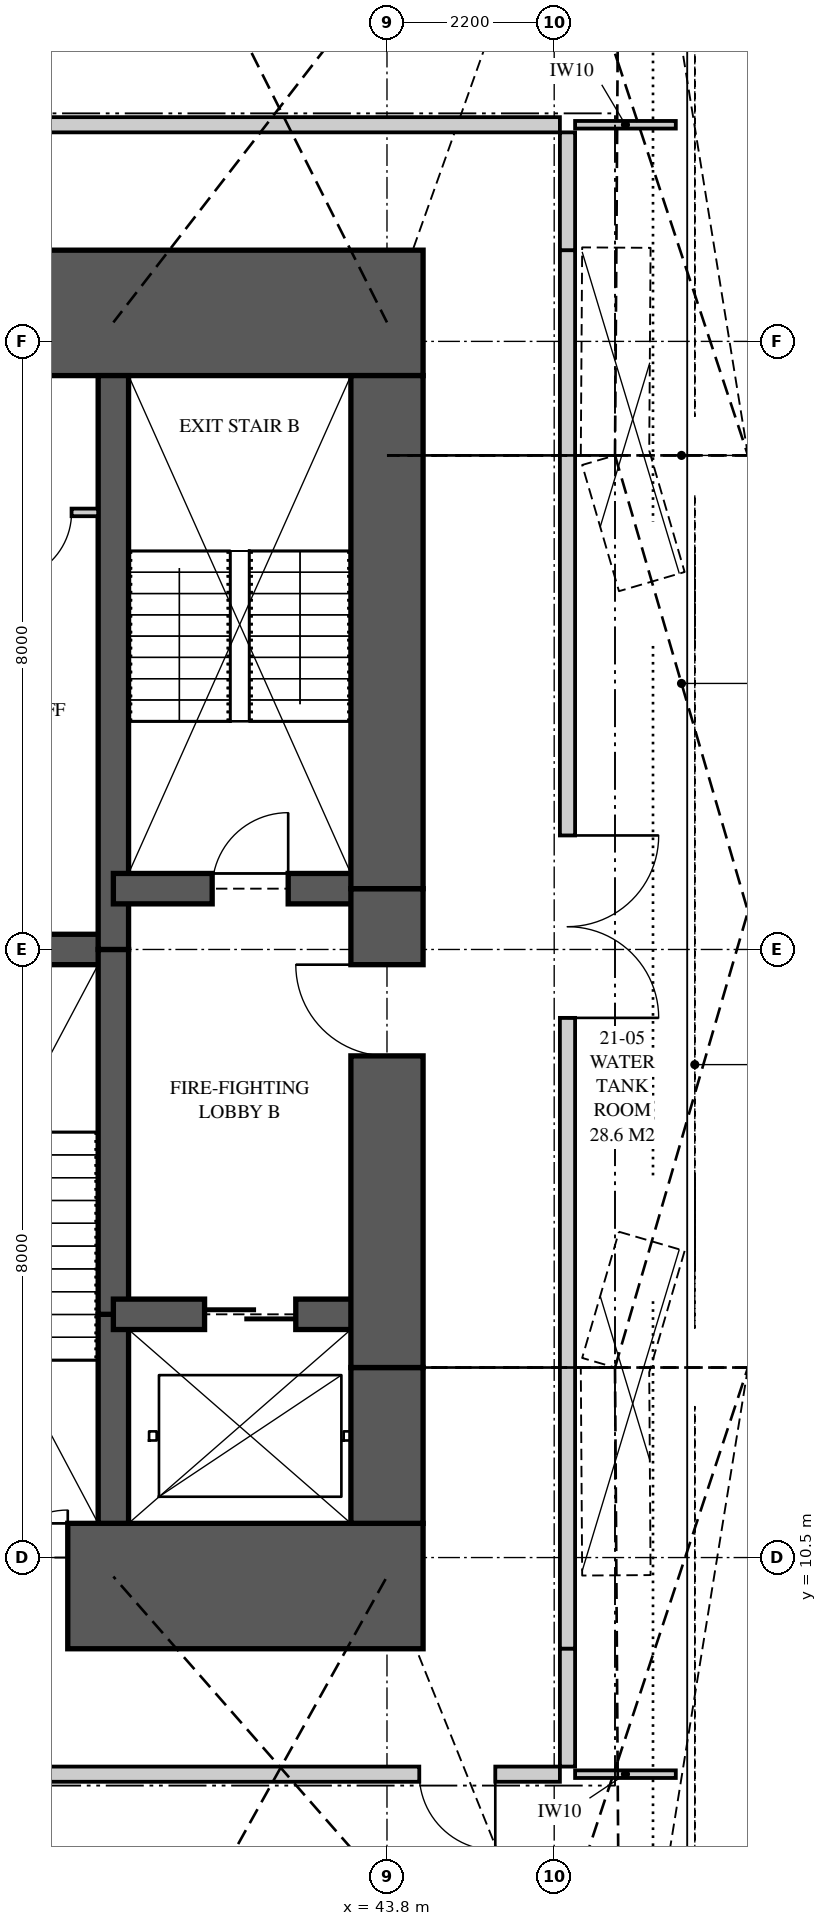
"""IFC4 building model, lengths in metres.
Left out: names, types, materials, properties, quantities, classifications, styles, units other than length and angle.
Written with IfcOpenShell. Run it as: python <this file> out.ifc"""

import sys

from ifc_helpers import new_model, si_unit, direction, frame, frame_2d, origin, place, context, subcontext, project, spatial, polyline, rectangle, outline, extrude, element, fill, save


model = new_model("IFC4")
c1 = context("Model", 3, precision=1e-05, world=origin(), true_north=direction((0.0, 1.0)))
c2 = subcontext(c1, "Body", "Model", "MODEL_VIEW")
j1 = project(units=[si_unit("LENGTHUNIT", "METRE"), si_unit("PLANEANGLEUNIT", "RADIAN")], contexts=[c1])
p1 = place(None, origin())
s1 = spatial("IfcSite", under=j1, at=p1, CompositionType="ELEMENT")
p2 = place(p1, origin())
s2 = spatial("IfcBuilding", under=s1, at=p2, CompositionType="ELEMENT")
p3 = place(p2, frame((0.0, 0.0, 79.75)))
s3 = spatial("IfcBuildingStorey", under=s2, at=p3, CompositionType="ELEMENT", Elevation=79.75)
p4 = place(p3, frame((35.9, 10.125, 0.0), z_axis=(0.0, 0.0, 1.0), x_axis=(1.0, 0.0, 0.0)))
e1 = element("IfcWall", 1, at=p4, inside=s3, PredefinedType="SHEAR", context=c2, shape_type="SweptSolid", body=[
    extrude(rectangle(XDim=8.375, YDim=1.65, at=frame_2d((4.188, 0.0))), origin(), (0.0, 0.0, 1.0), 5.0),
])
p5 = place(p4, frame((2.7, 0.0, 0.0)))
e2 = element("IfcOpeningElement", 2, at=p5, cuts=e1, PredefinedType="OPENING", context=c2, shape_type="SweptSolid", body=[
    extrude(rectangle(XDim=1.0, YDim=2.1, at=frame_2d((0.5, 1.05))), frame((0.0, 0.835, 0.0), z_axis=(0.0, -1.0, 0.0), x_axis=(1.0, 0.0, 0.0)), (0.0, 0.0, 1.0), 1.67),
])
p6 = place(p3, frame((44.275, 26.875, 0.0), z_axis=(0.0, 0.0, 1.0), x_axis=(-1.0, 0.0, 0.0)))
e3 = element("IfcWall", 3, at=p6, inside=s3, PredefinedType="SHEAR", context=c2, shape_type="SweptSolid", body=[
    extrude(rectangle(XDim=8.375, YDim=1.65, at=frame_2d((4.188, 0.0))), origin(), (0.0, 0.0, 1.0), 5.0),
])
p7 = place(p6, frame((5.775, 0.0, 0.0)))
e4 = element("IfcOpeningElement", 4, at=p7, cuts=e3, PredefinedType="OPENING", context=c2, shape_type="SweptSolid", body=[
    extrude(rectangle(XDim=0.9, YDim=2.1, at=frame_2d((0.45, 1.05))), frame((0.0, 0.835, 0.0), z_axis=(0.0, -1.0, 0.0), x_axis=(1.0, 0.0, 0.0)), (0.0, 0.0, 1.0), 1.67),
])
p8 = place(p3, frame((43.8, 10.95, 0.0), z_axis=(0.0, 0.0, 1.0), x_axis=(0.0, 1.0, 0.0)))
e5 = element("IfcWall", 5, at=p8, inside=s3, PredefinedType="SHEAR", context=c2, shape_type="SweptSolid", body=[
    extrude(rectangle(XDim=2.05, YDim=0.95, at=frame_2d((1.025, 0.0))), origin(), (0.0, 0.0, 1.0), 5.0),
])
p9 = place(p3, frame((43.8, 13.0, 0.0), z_axis=(0.0, 0.0, 1.0), x_axis=(0.0, 1.0, 0.0)))
e6 = element("IfcWall", 6, at=p9, inside=s3, PredefinedType="SHEAR", context=c2, shape_type="SweptSolid", body=[
    extrude(rectangle(XDim=6.3, YDim=0.95, at=frame_2d((3.15, 0.0))), origin(), (0.0, 0.0, 1.0), 5.0),
])
p10 = place(p9, frame((4.1, 0.0, 0.0)))
e7 = element("IfcOpeningElement", 7, at=p10, cuts=e6, PredefinedType="OPENING", context=c2, shape_type="SweptSolid", body=[
    extrude(rectangle(XDim=1.2, YDim=2.2, at=frame_2d((0.6, 1.1))), frame((0.0, 0.485, 0.0), z_axis=(0.0, -1.0, 0.0), x_axis=(1.0, 0.0, 0.0)), (0.0, 0.0, 1.0), 0.97),
])
p11 = place(p3, frame((43.8, 19.3, 0.0), z_axis=(0.0, 0.0, 1.0), x_axis=(0.0, 1.0, 0.0)))
e8 = element("IfcWall", 8, at=p11, inside=s3, PredefinedType="SHEAR", context=c2, shape_type="SweptSolid", body=[
    extrude(rectangle(XDim=6.75, YDim=0.95, at=frame_2d((3.375, 0.0))), origin(), (0.0, 0.0, 1.0), 5.0),
])
p12 = place(p3, frame((40.2, 10.95, 0.0), z_axis=(0.0, 0.0, 1.0), x_axis=(0.0, 1.0, 0.0)))
e9 = element("IfcWall", 9, at=p12, inside=s3, PredefinedType="SHEAR", context=c2, shape_type="SweptSolid", body=[
    extrude(rectangle(XDim=2.75, YDim=0.4, at=frame_2d((1.375, 0.0))), origin(), (0.0, 0.0, 1.0), 5.0),
])
p13 = place(p3, frame((40.2, 13.7, 0.0), z_axis=(0.0, 0.0, 1.0), x_axis=(0.0, 1.0, 0.0)))
e10 = element("IfcWall", 10, at=p13, inside=s3, PredefinedType="SHEAR", context=c2, shape_type="SweptSolid", body=[
    extrude(rectangle(XDim=4.8, YDim=0.4, at=frame_2d((2.4, 0.0))), origin(), (0.0, 0.0, 1.0), 5.0),
])
p14 = place(p3, frame((40.2, 18.5, 0.0), z_axis=(0.0, 0.0, 1.0), x_axis=(0.0, 1.0, 0.0)))
e11 = element("IfcWall", 11, at=p14, inside=s3, PredefinedType="SHEAR", context=c2, shape_type="SweptSolid", body=[
    extrude(rectangle(XDim=7.55, YDim=0.4, at=frame_2d((3.775, 0.0))), origin(), (0.0, 0.0, 1.0), 5.0),
])
p15 = place(p3, frame((35.9, 18.5, 0.0), z_axis=(0.0, 0.0, 1.0), x_axis=(1.0, 0.0, 0.0)))
e12 = element("IfcWall", 12, at=p15, inside=s3, PredefinedType="SHEAR", context=c2, shape_type="SweptSolid", body=[
    extrude(rectangle(XDim=4.3, YDim=0.4, at=frame_2d((2.15, 0.0))), origin(), (0.0, 0.0, 1.0), 5.0),
])
p16 = place(p3, frame((40.2, 13.7, 0.0), z_axis=(0.0, 0.0, 1.0), x_axis=(1.0, 0.0, 0.0)))
e13 = element("IfcWall", 13, at=p16, inside=s3, PredefinedType="SHEAR", context=c2, shape_type="SweptSolid", body=[
    extrude(rectangle(XDim=3.6, YDim=0.4, at=frame_2d((1.8, 0.0))), origin(), (0.0, 0.0, 1.0), 5.0),
])
p17 = place(p16, frame((1.2, 0.0, 0.0)))
e14 = element("IfcOpeningElement", 14, at=p17, cuts=e13, PredefinedType="OPENING", context=c2, shape_type="SweptSolid", body=[
    extrude(rectangle(XDim=1.2, YDim=2.1, at=frame_2d((0.6, 1.05))), frame((0.0, 0.21, 0.0), z_axis=(0.0, -1.0, 0.0), x_axis=(1.0, 0.0, 0.0)), (0.0, 0.0, 1.0), 0.42),
])
p18 = place(p3, frame((40.2, 19.3, 0.0), z_axis=(0.0, 0.0, 1.0), x_axis=(1.0, 0.0, 0.0)))
e15 = element("IfcWall", 15, at=p18, inside=s3, PredefinedType="SHEAR", context=c2, shape_type="SweptSolid", body=[
    extrude(rectangle(XDim=3.6, YDim=0.4, at=frame_2d((1.8, 0.0))), origin(), (0.0, 0.0, 1.0), 5.0),
])
p19 = place(p18, frame((1.3, 0.0, 0.0)))
e16 = element("IfcOpeningElement", 16, at=p19, cuts=e15, PredefinedType="OPENING", context=c2, shape_type="SweptSolid", body=[
    extrude(rectangle(XDim=1.0, YDim=2.1, at=frame_2d((0.5, 1.05))), frame((0.0, 0.21, 0.0), z_axis=(0.0, -1.0, 0.0), x_axis=(1.0, 0.0, 0.0)), (0.0, 0.0, 1.0), 0.42),
])
p20 = place(p3, frame((17.725, 7.65, 0.0), z_axis=(0.0, 0.0, 1.0), x_axis=(1.0, 0.0, 0.0)))
e17 = element("IfcWall", 17, at=p20, inside=s3, PredefinedType="PARTITIONING", context=c2, shape_type="SweptSolid", body=[
    extrude(outline(polyline([(28.35, 0.0), (28.35, 4.72), (27.701, 4.72), (27.701, 3.22), (26.543, 3.22), (26.543, 4.72), (25.152, 4.72), (25.152, 4.141), (24.302, 4.141), (24.302, 4.72), (16.298, 4.72), (16.298, 4.141), (15.495, 4.141), (15.495, 4.72), (14.133, 4.72), (14.133, 4.141), (13.223, 4.141), (13.223, 4.72), (10.314, 4.72), (10.314, 4.194), (9.736, 4.194), (9.736, 4.72), (6.153, 4.72), (6.153, 4.141), (5.295, 4.141), (5.295, 4.72), (4.833, 4.72), (4.833, 4.141), (4.051, 4.141), (4.051, 4.72), (1.684, 4.72), (1.684, 4.141), (1.119, 4.141), (1.119, 4.72), (0.0, 4.72), (0.0, 0.0), (28.35, 0.0)]), holes=[polyline([(9.18, 3.208), (9.224, 3.323), (9.821, 3.385), (9.821, 2.858), (9.778, 2.743), (9.18, 2.68), (9.18, 3.208)])]), frame((0.0, 0.1, 0.0), z_axis=(0.0, -1.0, 0.0), x_axis=(1.0, 0.0, 0.0)), (0.0, 0.0, 1.0), 0.2),
])
p21 = place(p20, frame((0.85, 0.0, 0.0)))
e18 = element("IfcOpeningElement", 18, at=p21, cuts=e17, PredefinedType="OPENING", context=c2, shape_type="SweptSolid", body=[
    extrude(rectangle(XDim=1.0, YDim=2.1, at=frame_2d((0.5, 1.05))), frame((0.0, 0.11, 0.0), z_axis=(0.0, -1.0, 0.0), x_axis=(1.0, 0.0, 0.0)), (0.0, 0.0, 1.0), 0.22),
])
p22 = place(p20, frame((26.5, 0.0, 0.0)))
e19 = element("IfcOpeningElement", 19, at=p22, cuts=e17, PredefinedType="OPENING", context=c2, shape_type="SweptSolid", body=[
    extrude(rectangle(XDim=1.0, YDim=2.1, at=frame_2d((0.5, 1.05))), frame((0.0, 0.11, 0.0), z_axis=(0.0, -1.0, 0.0), x_axis=(1.0, 0.0, 0.0)), (0.0, 0.0, 1.0), 0.22),
])
p23 = place(p3, frame((46.175, 7.75, 0.0), z_axis=(0.0, 0.0, 1.0), x_axis=(0.0, 1.0, 0.0)))
e20 = element("IfcWall", 20, at=p23, inside=s3, PredefinedType="PARTITIONING", context=c2, shape_type="SweptSolid", body=[
    extrude(rectangle(XDim=1.55, YDim=0.2, at=frame_2d((0.775, 0.0))), origin(), (0.0, 0.0, 1.0), 4.72),
])
p24 = place(p3, frame((17.725, 29.35, 0.0), z_axis=(0.0, 0.0, 1.0), x_axis=(1.0, 0.0, 0.0)))
e21 = element("IfcWall", 21, at=p24, inside=s3, PredefinedType="PARTITIONING", context=c2, shape_type="SweptSolid", body=[
    extrude(outline(polyline([(28.35, 0.0), (28.35, 4.72), (27.567, 4.72), (27.567, 3.22), (26.434, 3.22), (26.434, 4.72), (25.083, 4.72), (25.083, 4.141), (24.111, 4.141), (24.111, 4.72), (16.498, 4.72), (16.498, 4.141), (15.737, 4.141), (15.737, 4.72), (13.833, 4.72), (13.833, 4.141), (12.979, 4.141), (12.979, 4.72), (10.314, 4.72), (10.314, 4.194), (9.736, 4.194), (9.736, 4.72), (6.376, 4.72), (6.376, 4.141), (5.567, 4.141), (5.567, 4.72), (4.602, 4.72), (4.602, 4.141), (3.861, 4.141), (3.861, 4.72), (1.763, 4.72), (1.763, 4.141), (1.209, 4.141), (1.209, 4.72), (0.0, 4.72), (0.0, 0.0), (28.35, 0.0)]), holes=[polyline([(9.234, 3.349), (9.274, 3.453), (9.869, 3.504), (9.869, 2.988), (9.83, 2.883), (9.234, 2.832), (9.234, 3.349)])]), frame((0.0, 0.1, 0.0), z_axis=(0.0, -1.0, 0.0), x_axis=(1.0, 0.0, 0.0)), (0.0, 0.0, 1.0), 0.2),
])
p25 = place(p24, frame((13.275, 0.0, 0.0)))
e22 = element("IfcOpeningElement", 22, at=p25, cuts=e21, PredefinedType="OPENING", context=c2, shape_type="SweptSolid", body=[
    extrude(rectangle(XDim=2.4, YDim=2.4, at=frame_2d((1.2, 1.2))), frame((0.0, 0.11, 0.0), z_axis=(0.0, -1.0, 0.0), x_axis=(1.0, 0.0, 0.0)), (0.0, 0.0, 1.0), 0.22),
])
p26 = place(p3, frame((46.175, 27.7, 0.0), z_axis=(0.0, 0.0, 1.0), x_axis=(0.0, 1.0, 0.0)))
e23 = element("IfcWall", 23, at=p26, inside=s3, PredefinedType="PARTITIONING", context=c2, shape_type="SweptSolid", body=[
    extrude(rectangle(XDim=1.55, YDim=0.2, at=frame_2d((0.775, 0.0))), origin(), (0.0, 0.0, 1.0), 4.72),
])
p27 = place(p3, frame((46.175, 9.3, 0.0), z_axis=(0.0, 0.0, 1.0), x_axis=(0.0, 1.0, 0.0)))
e24 = element("IfcWall", 24, at=p27, inside=s3, PredefinedType="PARTITIONING", context=c2, shape_type="SweptSolid", body=[
    extrude(outline(polyline([(18.4, 0.0), (18.4, 4.72), (16.2, 4.72), (16.2, 3.72), (15.2, 3.72), (15.2, 4.72), (4.2, 4.72), (4.2, 3.72), (3.2, 3.72), (3.2, 4.72), (0.0, 4.72), (0.0, 0.0), (2.94, 0.0), (2.94, 0.78), (3.454, 0.78), (3.454, 1.001), (3.946, 1.001), (3.946, 0.78), (4.46, 0.78), (4.46, 0.0), (14.94, 0.0), (14.94, 0.78), (15.454, 0.78), (15.454, 1.001), (15.946, 1.001), (15.946, 0.78), (16.46, 0.78), (16.46, 0.0), (18.4, 0.0)])), frame((0.0, 0.1, 0.0), z_axis=(0.0, -1.0, 0.0), x_axis=(1.0, 0.0, 0.0)), (0.0, 0.0, 1.0), 0.2),
])
p28 = place(p27, frame((8.3, 0.0, 0.0)))
e25 = element("IfcOpeningElement", 25, at=p28, cuts=e24, PredefinedType="OPENING", context=c2, shape_type="SweptSolid", body=[
    extrude(rectangle(XDim=2.4, YDim=2.4, at=frame_2d((1.2, 1.2))), frame((0.0, 0.11, 0.0), z_axis=(0.0, -1.0, 0.0), x_axis=(1.0, 0.0, 0.0)), (0.0, 0.0, 1.0), 0.22),
])
p29 = place(p3, frame((46.275, 7.65, 0.0), z_axis=(0.0, 0.0, 1.0), x_axis=(1.0, 0.0, 0.0)))
e26 = element("IfcWall", 26, at=p29, inside=s3, PredefinedType="PARTITIONING", context=c2, shape_type="SweptSolid", body=[
    extrude(outline(polyline([(0.057, 0.998), (0.0, 0.998), (0.0, 0.0), (1.325, 0.0), (1.325, 2.9), (0.536, 2.9), (0.536, 4.72), (0.0, 4.72), (0.0, 1.977), (0.15, 1.977), (0.15, 2.091), (0.151, 2.146), (0.971, 2.148), (0.971, 1.26), (0.97, 1.236), (0.97, 1.205), (0.952, 1.204), (0.952, 1.166), (0.915, 1.115), (0.057, 0.998)])), frame((0.0, 0.05, 0.0), z_axis=(0.0, -1.0, 0.0), x_axis=(1.0, 0.0, 0.0)), (0.0, 0.0, 1.0), 0.1),
])
p30 = place(p3, frame((46.275, 29.35, 0.0), z_axis=(0.0, 0.0, 1.0), x_axis=(1.0, 0.0, 0.0)))
e27 = element("IfcWall", 27, at=p30, inside=s3, PredefinedType="PARTITIONING", context=c2, shape_type="SweptSolid", body=[
    extrude(outline(polyline([(0.698, 4.72), (0.0, 4.72), (0.0, 0.0), (1.325, 0.0), (1.325, 1.452), (0.964, 1.452), (0.964, 0.806), (0.963, 0.751), (0.143, 0.749), (0.143, 1.637), (0.144, 1.692), (0.387, 1.693), (0.387, 2.337), (0.425, 2.389), (1.283, 2.505), (1.325, 2.505), (1.325, 2.9), (0.698, 2.9), (0.698, 4.72)])), frame((0.0, 0.05, 0.0), z_axis=(0.0, -1.0, 0.0), x_axis=(1.0, 0.0, 0.0)), (0.0, 0.0, 1.0), 0.1),
])
p31 = place(p3, frame((36.1, 24.25, 0.0), z_axis=(0.0, 0.0, 1.0), x_axis=(1.0, 0.0, 0.0)))
e28 = element("IfcWall", 28, at=p31, inside=s3, PredefinedType="PARTITIONING", context=c2, shape_type="SweptSolid", body=[
    extrude(rectangle(XDim=3.9, YDim=0.1, at=frame_2d((1.95, 0.0))), origin(), (0.0, 0.0, 1.0), 4.72),
])
p32 = place(p31, frame((0.7, 0.0, 0.0)))
e29 = element("IfcOpeningElement", 29, at=p32, cuts=e28, PredefinedType="OPENING", context=c2, shape_type="SweptSolid", body=[
    extrude(rectangle(XDim=0.9, YDim=2.1, at=frame_2d((0.45, 1.05))), frame((0.0, 0.06, 0.0), z_axis=(0.0, -1.0, 0.0), x_axis=(1.0, 0.0, 0.0)), (0.0, 0.0, 1.0), 0.12),
])
p33 = place(p31, frame((2.65, 0.0, 0.0)))
e30 = element("IfcOpeningElement", 30, at=p33, cuts=e28, PredefinedType="OPENING", context=c2, shape_type="SweptSolid", body=[
    extrude(rectangle(XDim=0.9, YDim=2.1, at=frame_2d((0.45, 1.05))), frame((0.0, 0.06, 0.0), z_axis=(0.0, -1.0, 0.0), x_axis=(1.0, 0.0, 0.0)), (0.0, 0.0, 1.0), 0.12),
])
p34 = place(p22, frame((1.0, 0.0, 0.0), z_axis=(0.0, 0.0, 1.0), x_axis=(-1.0, 0.0, 0.0)))
e31 = element("IfcDoor", 31, at=p34, inside=s3, OperationType="SINGLE_SWING_LEFT", PredefinedType="DOOR", context=c2, shape_type="SweptSolid", body=[
    extrude(rectangle(XDim=1.0, YDim=2.1, at=frame_2d((0.5, 1.05))), frame((0.0, 0.025, 0.0), z_axis=(0.0, -1.0, 0.0), x_axis=(1.0, 0.0, 0.0)), (0.0, 0.0, 1.0), 0.05),
])
fill(e19, e31)
p35 = place(p28, frame((2.4, 0.0, 0.0), z_axis=(0.0, 0.0, 1.0), x_axis=(-1.0, 0.0, 0.0)))
e32 = element("IfcDoor", 32, at=p35, inside=s3, OperationType="DOUBLE_DOOR_SINGLE_SWING", PredefinedType="DOOR", context=c2, shape_type="SweptSolid", body=[
    extrude(rectangle(XDim=2.4, YDim=2.4, at=frame_2d((1.2, 1.2))), frame((0.0, 0.025, 0.0), z_axis=(0.0, -1.0, 0.0), x_axis=(1.0, 0.0, 0.0)), (0.0, 0.0, 1.0), 0.05),
])
fill(e25, e32)
p36 = place(p33, frame((0.9, 0.0, 0.0), z_axis=(0.0, 0.0, 1.0), x_axis=(-1.0, 0.0, 0.0)))
e33 = element("IfcDoor", 33, at=p36, inside=s3, OperationType="SINGLE_SWING_RIGHT", PredefinedType="DOOR", context=c2, shape_type="SweptSolid", body=[
    extrude(rectangle(XDim=0.9, YDim=2.1, at=frame_2d((0.45, 1.05))), frame((0.0, 0.025, 0.0), z_axis=(0.0, -1.0, 0.0), x_axis=(1.0, 0.0, 0.0)), (0.0, 0.0, 1.0), 0.05),
])
fill(e30, e33)
p37 = place(p19, origin())
e34 = element("IfcDoor", 34, at=p37, inside=s3, OperationType="SINGLE_SWING_RIGHT", PredefinedType="DOOR", context=c2, shape_type="SweptSolid", body=[
    extrude(rectangle(XDim=1.0, YDim=2.1, at=frame_2d((0.5, 1.05))), frame((0.0, 0.025, 0.0), z_axis=(0.0, -1.0, 0.0), x_axis=(1.0, 0.0, 0.0)), (0.0, 0.0, 1.0), 0.05),
])
fill(e16, e34)
p38 = place(p10, origin())
e35 = element("IfcDoor", 35, at=p38, inside=s3, OperationType="SINGLE_SWING_RIGHT", PredefinedType="DOOR", context=c2, shape_type="SweptSolid", body=[
    extrude(rectangle(XDim=1.2, YDim=2.2, at=frame_2d((0.6, 1.1))), frame((0.0, 0.025, 0.0), z_axis=(0.0, -1.0, 0.0), x_axis=(1.0, 0.0, 0.0)), (0.0, 0.0, 1.0), 0.05),
])
fill(e7, e35)
p39 = place(p17, origin())
e36 = element("IfcDoor", 36, at=p39, inside=s3, OperationType="SLIDING_TO_LEFT", PredefinedType="DOOR", context=c2, shape_type="SweptSolid", body=[
    extrude(rectangle(XDim=1.2, YDim=2.1, at=frame_2d((0.6, 1.05))), frame((0.0, 0.025, 0.0), z_axis=(0.0, -1.0, 0.0), x_axis=(1.0, 0.0, 0.0)), (0.0, 0.0, 1.0), 0.05),
])
fill(e14, e36)
p40 = place(p5, origin())
e37 = element("IfcDoor", 37, at=p40, inside=s3, OperationType="SINGLE_SWING_RIGHT", PredefinedType="DOOR", context=c2, shape_type="SweptSolid", body=[
    extrude(rectangle(XDim=1.0, YDim=2.1, at=frame_2d((0.5, 1.05))), frame((0.0, 0.025, 0.0), z_axis=(0.0, -1.0, 0.0), x_axis=(1.0, 0.0, 0.0)), (0.0, 0.0, 1.0), 0.05),
])
fill(e2, e37)
save(model, sys.argv[1])
